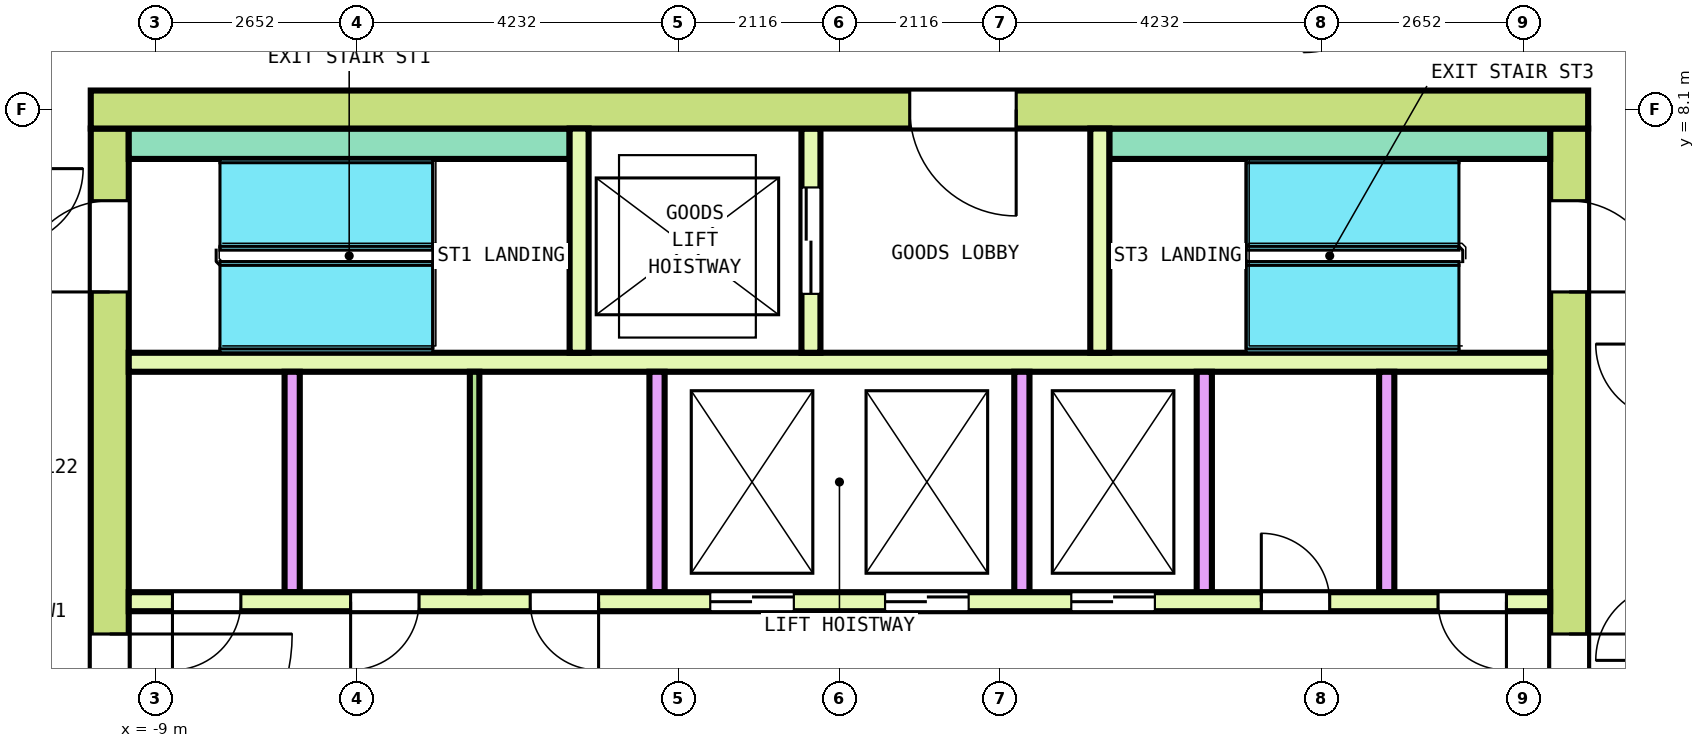
"""IFC4 building model, lengths in metres.
Left out: names, types, materials, properties, quantities, classifications, styles, units other than length and angle.
Written with IfcOpenShell. Run it as: python <this file> out.ifc"""

import sys

from ifc_helpers import new_model, si_unit, direction, frame, frame_2d, origin, place, context, subcontext, project, spatial, rectangle, extrude, element, fill, save


model = new_model("IFC4")
c1 = context("Model", 3, precision=1e-05, world=origin(), true_north=direction((0.0, 1.0)))
c2 = subcontext(c1, "Body", "Model", "MODEL_VIEW")
j1 = project(units=[si_unit("LENGTHUNIT", "METRE"), si_unit("PLANEANGLEUNIT", "RADIAN")], contexts=[c1])
p1 = place(None, origin())
s1 = spatial("IfcSite", under=j1, at=p1, CompositionType="ELEMENT")
p2 = place(p1, origin())
s2 = spatial("IfcBuilding", under=s1, at=p2, CompositionType="ELEMENT")
p3 = place(p2, frame((0.0, 0.0, 267.0)))
s3 = spatial("IfcBuildingStorey", under=s2, at=p3, CompositionType="ELEMENT", Elevation=267.0)
p4 = place(p3, frame((-9.85, 8.1, 0.0), z_axis=(0.0, 0.0, 1.0), x_axis=(1.0, 0.0, 0.0)))
e1 = element("IfcWall", 1, at=p4, inside=s3, PredefinedType="SHEAR", context=c2, shape_type="SweptSolid", body=[
    extrude(rectangle(XDim=19.7, YDim=0.5, at=frame_2d((9.85, 0.0))), origin(), (0.0, 0.0, 1.0), 3.7),
])
p5 = place(p4, frame((10.775, 0.0, 0.0)))
e2 = element("IfcOpeningElement", 2, at=p5, cuts=e1, PredefinedType="OPENING", context=c2, shape_type="SweptSolid", body=[
    extrude(rectangle(XDim=1.4, YDim=2.1, at=frame_2d((0.7, 1.05))), frame((0.0, 0.26, 0.0), z_axis=(0.0, -1.0, 0.0), x_axis=(1.0, 0.0, 0.0)), (0.0, 0.0, 1.0), 0.52),
])
p6 = place(p3, frame((-9.6, -7.85, 0.0), z_axis=(0.0, 0.0, 1.0), x_axis=(0.0, 1.0, 0.0)))
e3 = element("IfcWall", 3, at=p6, inside=s3, PredefinedType="SHEAR", context=c2, shape_type="SweptSolid", body=[
    extrude(rectangle(XDim=15.7, YDim=0.5, at=frame_2d((7.85, 0.0))), origin(), (0.0, 0.0, 1.0), 3.7),
])
p7 = place(p6, frame((6.65, 0.0, 0.0)))
e4 = element("IfcOpeningElement", 4, at=p7, cuts=e3, PredefinedType="OPENING", context=c2, shape_type="SweptSolid", body=[
    extrude(rectangle(XDim=2.4, YDim=2.1, at=frame_2d((1.2, 1.05))), frame((0.0, 0.26, 0.0), z_axis=(0.0, -1.0, 0.0), x_axis=(1.0, 0.0, 0.0)), (0.0, 0.0, 1.0), 0.52),
])
p8 = place(p6, frame((13.55, 0.0, 0.0)))
e5 = element("IfcOpeningElement", 5, at=p8, cuts=e3, PredefinedType="OPENING", context=c2, shape_type="SweptSolid", body=[
    extrude(rectangle(XDim=1.2, YDim=2.1, at=frame_2d((0.6, 1.05))), frame((0.0, 0.26, 0.0), z_axis=(0.0, -1.0, 0.0), x_axis=(1.0, 0.0, 0.0)), (0.0, 0.0, 1.0), 0.52),
])
p9 = place(p6, frame((0.95, 0.0, 0.0)))
e6 = element("IfcOpeningElement", 6, at=p9, cuts=e3, PredefinedType="OPENING", context=c2, shape_type="SweptSolid", body=[
    extrude(rectangle(XDim=1.2, YDim=2.1, at=frame_2d((0.6, 1.05))), frame((0.0, 0.26, 0.0), z_axis=(0.0, -1.0, 0.0), x_axis=(1.0, 0.0, 0.0)), (0.0, 0.0, 1.0), 0.52),
])
p10 = place(p3, frame((9.6, -7.85, 0.0), z_axis=(0.0, 0.0, 1.0), x_axis=(0.0, 1.0, 0.0)))
e7 = element("IfcWall", 7, at=p10, inside=s3, PredefinedType="SHEAR", context=c2, shape_type="SweptSolid", body=[
    extrude(rectangle(XDim=15.7, YDim=0.5, at=frame_2d((7.85, 0.0))), origin(), (0.0, 0.0, 1.0), 3.7),
])
p11 = place(p10, frame((6.65, 0.0, 0.0)))
e8 = element("IfcOpeningElement", 8, at=p11, cuts=e7, PredefinedType="OPENING", context=c2, shape_type="SweptSolid", body=[
    extrude(rectangle(XDim=2.4, YDim=2.1, at=frame_2d((1.2, 1.05))), frame((0.0, 0.26, 0.0), z_axis=(0.0, -1.0, 0.0), x_axis=(1.0, 0.0, 0.0)), (0.0, 0.0, 1.0), 0.52),
])
p12 = place(p10, frame((13.55, 0.0, 0.0)))
e9 = element("IfcOpeningElement", 9, at=p12, cuts=e7, PredefinedType="OPENING", context=c2, shape_type="SweptSolid", body=[
    extrude(rectangle(XDim=1.2, YDim=2.1, at=frame_2d((0.6, 1.05))), frame((0.0, 0.26, 0.0), z_axis=(0.0, -1.0, 0.0), x_axis=(1.0, 0.0, 0.0)), (0.0, 0.0, 1.0), 0.52),
])
p13 = place(p10, frame((1.05, 0.0, 0.0)))
e10 = element("IfcOpeningElement", 10, at=p13, cuts=e7, PredefinedType="OPENING", context=c2, shape_type="SweptSolid", body=[
    extrude(rectangle(XDim=1.0, YDim=2.1, at=frame_2d((0.5, 1.05))), frame((0.0, 0.26, 0.0), z_axis=(0.0, -1.0, 0.0), x_axis=(1.0, 0.0, 0.0)), (0.0, 0.0, 1.0), 0.52),
])
p14 = place(p3, frame((-9.35, 1.625, 0.0), z_axis=(0.0, 0.0, 1.0), x_axis=(1.0, 0.0, 0.0)))
e11 = element("IfcWall", 11, at=p14, inside=s3, PredefinedType="SOLIDWALL", context=c2, shape_type="SweptSolid", body=[
    extrude(rectangle(XDim=18.7, YDim=0.25, at=frame_2d((9.35, 0.0))), origin(), (0.0, 0.0, 1.0), 3.7),
])
p15 = place(p14, frame((7.65, 0.0, 0.0)))
e12 = element("IfcOpeningElement", 12, at=p15, cuts=e11, PredefinedType="OPENING", context=c2, shape_type="SweptSolid", body=[
    extrude(rectangle(XDim=1.1, YDim=2.1, at=frame_2d((0.55, 1.05))), frame((0.0, 0.135, 0.0), z_axis=(0.0, -1.0, 0.0), x_axis=(1.0, 0.0, 0.0)), (0.0, 0.0, 1.0), 0.27),
])
p16 = place(p14, frame((9.95, 0.0, 0.0)))
e13 = element("IfcOpeningElement", 13, at=p16, cuts=e11, PredefinedType="OPENING", context=c2, shape_type="SweptSolid", body=[
    extrude(rectangle(XDim=1.1, YDim=2.1, at=frame_2d((0.55, 1.05))), frame((0.0, 0.135, 0.0), z_axis=(0.0, -1.0, 0.0), x_axis=(1.0, 0.0, 0.0)), (0.0, 0.0, 1.0), 0.27),
])
p17 = place(p14, frame((12.4, 0.0, 0.0)))
e14 = element("IfcOpeningElement", 14, at=p17, cuts=e11, PredefinedType="OPENING", context=c2, shape_type="SweptSolid", body=[
    extrude(rectangle(XDim=1.1, YDim=2.1, at=frame_2d((0.55, 1.05))), frame((0.0, 0.135, 0.0), z_axis=(0.0, -1.0, 0.0), x_axis=(1.0, 0.0, 0.0)), (0.0, 0.0, 1.0), 0.27),
])
p18 = place(p14, frame((0.575, 0.0, 0.0)))
e15 = element("IfcOpeningElement", 15, at=p18, cuts=e11, PredefinedType="OPENING", context=c2, shape_type="SweptSolid", body=[
    extrude(rectangle(XDim=0.9, YDim=2.1, at=frame_2d((0.45, 1.05))), frame((0.0, 0.135, 0.0), z_axis=(0.0, -1.0, 0.0), x_axis=(1.0, 0.0, 0.0)), (0.0, 0.0, 1.0), 0.27),
])
p19 = place(p14, frame((2.919, 0.0, 0.0)))
e16 = element("IfcOpeningElement", 16, at=p19, cuts=e11, PredefinedType="OPENING", context=c2, shape_type="SweptSolid", body=[
    extrude(rectangle(XDim=0.9, YDim=2.1, at=frame_2d((0.45, 1.05))), frame((0.0, 0.135, 0.0), z_axis=(0.0, -1.0, 0.0), x_axis=(1.0, 0.0, 0.0)), (0.0, 0.0, 1.0), 0.27),
])
p20 = place(p14, frame((5.281, 0.0, 0.0)))
e17 = element("IfcOpeningElement", 17, at=p20, cuts=e11, PredefinedType="OPENING", context=c2, shape_type="SweptSolid", body=[
    extrude(rectangle(XDim=0.9, YDim=2.1, at=frame_2d((0.45, 1.05))), frame((0.0, 0.135, 0.0), z_axis=(0.0, -1.0, 0.0), x_axis=(1.0, 0.0, 0.0)), (0.0, 0.0, 1.0), 0.27),
])
p21 = place(p14, frame((14.9, 0.0, 0.0)))
e18 = element("IfcOpeningElement", 18, at=p21, cuts=e11, PredefinedType="OPENING", context=c2, shape_type="SweptSolid", body=[
    extrude(rectangle(XDim=0.9, YDim=2.1, at=frame_2d((0.45, 1.05))), frame((0.0, 0.135, 0.0), z_axis=(0.0, -1.0, 0.0), x_axis=(1.0, 0.0, 0.0)), (0.0, 0.0, 1.0), 0.27),
])
p22 = place(p14, frame((17.225, 0.0, 0.0)))
e19 = element("IfcOpeningElement", 19, at=p22, cuts=e11, PredefinedType="OPENING", context=c2, shape_type="SweptSolid", body=[
    extrude(rectangle(XDim=0.9, YDim=2.1, at=frame_2d((0.45, 1.05))), frame((0.0, 0.135, 0.0), z_axis=(0.0, -1.0, 0.0), x_axis=(1.0, 0.0, 0.0)), (0.0, 0.0, 1.0), 0.27),
])
p23 = place(p3, frame((-9.35, 4.775, 0.0), z_axis=(0.0, 0.0, 1.0), x_axis=(1.0, 0.0, 0.0)))
e20 = element("IfcWall", 20, at=p23, inside=s3, PredefinedType="SOLIDWALL", context=c2, shape_type="SweptSolid", body=[
    extrude(rectangle(XDim=18.7, YDim=0.25, at=frame_2d((9.35, 0.0))), origin(), (0.0, 0.0, 1.0), 3.7),
])
for number, where, z_axis, x_axis in (
    (21, (-7.2, 1.75, 0.0), (0.0, 0.0, 1.0), (0.0, 1.0, 0.0)),
    (22, (-2.4, 1.75, 0.0), (0.0, 0.0, 1.0), (0.0, 1.0, 0.0)),
    (23, (2.4, 1.75, 0.0), (0.0, 0.0, 1.0), (0.0, 1.0, 0.0)),
    (24, (4.8, 1.75, 0.0), (0.0, 0.0, 1.0), (0.0, 1.0, 0.0)),
    (25, (7.2, 1.75, 0.0), (0.0, 0.0, 1.0), (0.0, 1.0, 0.0)),
):
    element("IfcWall", number, at=place(p3, frame(where, z_axis=z_axis, x_axis=x_axis)), inside=s3, PredefinedType="SOLIDWALL", context=c2, shape_type="SweptSolid", body=[
        extrude(rectangle(XDim=2.9, YDim=0.2, at=frame_2d((1.45, 0.0))), origin(), (0.0, 0.0, 1.0), 3.7),
    ])
for number, where, z_axis, x_axis in (
    (26, (-9.35, 7.65, 0.0), (0.0, 0.0, 1.0), (1.0, 0.0, 0.0)),
    (27, (3.55, 7.65, 0.0), (0.0, 0.0, 1.0), (1.0, 0.0, 0.0)),
):
    element("IfcWall", number, at=place(p3, frame(where, z_axis=z_axis, x_axis=x_axis)), inside=s3, PredefinedType="SOLIDWALL", context=c2, shape_type="SweptSolid", body=[
        extrude(rectangle(XDim=5.8, YDim=0.4, at=frame_2d((2.9, 0.0))), origin(), (0.0, 0.0, 1.0), 3.7),
    ])
p24 = place(p3, frame((-3.425, 4.9, 0.0), z_axis=(0.0, 0.0, 1.0), x_axis=(0.0, 1.0, 0.0)))
e28 = element("IfcWall", 28, at=p24, inside=s3, PredefinedType="SOLIDWALL", context=c2, shape_type="SweptSolid", body=[
    extrude(rectangle(XDim=2.95, YDim=0.25, at=frame_2d((1.475, 0.0))), origin(), (0.0, 0.0, 1.0), 3.7),
])
p25 = place(p3, frame((-0.375, 4.9, 0.0), z_axis=(0.0, 0.0, 1.0), x_axis=(0.0, 1.0, 0.0)))
e29 = element("IfcWall", 29, at=p25, inside=s3, PredefinedType="SOLIDWALL", context=c2, shape_type="SweptSolid", body=[
    extrude(rectangle(XDim=2.95, YDim=0.25, at=frame_2d((1.475, 0.0))), origin(), (0.0, 0.0, 1.0), 3.7),
])
p26 = place(p25, frame((0.775, 0.0, 0.0)))
e30 = element("IfcOpeningElement", 30, at=p26, cuts=e29, PredefinedType="OPENING", context=c2, shape_type="SweptSolid", body=[
    extrude(rectangle(XDim=1.4, YDim=2.1, at=frame_2d((0.7, 1.05))), frame((0.0, 0.135, 0.0), z_axis=(0.0, -1.0, 0.0), x_axis=(1.0, 0.0, 0.0)), (0.0, 0.0, 1.0), 0.27),
])
p27 = place(p3, frame((3.425, 4.9, 0.0), z_axis=(0.0, 0.0, 1.0), x_axis=(0.0, 1.0, 0.0)))
e31 = element("IfcWall", 31, at=p27, inside=s3, PredefinedType="SOLIDWALL", context=c2, shape_type="SweptSolid", body=[
    extrude(rectangle(XDim=2.95, YDim=0.25, at=frame_2d((1.475, 0.0))), origin(), (0.0, 0.0, 1.0), 3.7),
])
p28 = place(p3, frame((-4.8, 1.75, 0.0), z_axis=(0.0, 0.0, 1.0), x_axis=(0.0, 1.0, 0.0)))
e32 = element("IfcWall", 32, at=p28, inside=s3, PredefinedType="PARTITIONING", context=c2, shape_type="SweptSolid", body=[
    extrude(rectangle(XDim=2.9, YDim=0.125, at=frame_2d((1.45, 0.0))), origin(), (0.0, 0.0, 1.0), 3.7),
])
p29 = place(p15, origin())
e33 = element("IfcDoor", 33, at=p29, inside=s3, OperationType="DOUBLE_DOOR_SLIDING", PredefinedType="DOOR", context=c2, shape_type="SweptSolid", body=[
    extrude(rectangle(XDim=1.1, YDim=2.1, at=frame_2d((0.55, 1.05))), frame((0.0, 0.075, 0.0), z_axis=(0.0, -1.0, 0.0), x_axis=(1.0, 0.0, 0.0)), (0.0, 0.0, 1.0), 0.15),
])
fill(e12, e33)
p30 = place(p16, origin())
e34 = element("IfcDoor", 34, at=p30, inside=s3, OperationType="DOUBLE_DOOR_SLIDING", PredefinedType="DOOR", context=c2, shape_type="SweptSolid", body=[
    extrude(rectangle(XDim=1.1, YDim=2.1, at=frame_2d((0.55, 1.05))), frame((0.0, 0.075, 0.0), z_axis=(0.0, -1.0, 0.0), x_axis=(1.0, 0.0, 0.0)), (0.0, 0.0, 1.0), 0.15),
])
fill(e13, e34)
p31 = place(p17, origin())
e35 = element("IfcDoor", 35, at=p31, inside=s3, OperationType="DOUBLE_DOOR_SLIDING", PredefinedType="DOOR", context=c2, shape_type="SweptSolid", body=[
    extrude(rectangle(XDim=1.1, YDim=2.1, at=frame_2d((0.55, 1.05))), frame((0.0, 0.075, 0.0), z_axis=(0.0, -1.0, 0.0), x_axis=(1.0, 0.0, 0.0)), (0.0, 0.0, 1.0), 0.15),
])
fill(e14, e35)
p32 = place(p26, origin())
e36 = element("IfcDoor", 36, at=p32, inside=s3, OperationType="DOUBLE_DOOR_SLIDING", PredefinedType="DOOR", context=c2, shape_type="SweptSolid", body=[
    extrude(rectangle(XDim=1.4, YDim=2.1, at=frame_2d((0.7, 1.05))), frame((0.0, 0.075, 0.0), z_axis=(0.0, -1.0, 0.0), x_axis=(1.0, 0.0, 0.0)), (0.0, 0.0, 1.0), 0.15),
])
fill(e30, e36)
p33 = place(p7, origin())
e37 = element("IfcDoor", 37, at=p33, inside=s3, OperationType="DOUBLE_DOOR_SINGLE_SWING", PredefinedType="DOOR", context=c2, shape_type="SweptSolid", body=[
    extrude(rectangle(XDim=2.4, YDim=2.1, at=frame_2d((1.2, 1.05))), frame((0.0, 0.2, 0.0), z_axis=(0.0, -1.0, 0.0), x_axis=(1.0, 0.0, 0.0)), (0.0, 0.0, 1.0), 0.4),
])
fill(e4, e37)
p34 = place(p11, origin())
e38 = element("IfcDoor", 38, at=p34, inside=s3, OperationType="DOUBLE_DOOR_SINGLE_SWING", PredefinedType="DOOR", context=c2, shape_type="SweptSolid", body=[
    extrude(rectangle(XDim=2.4, YDim=2.1, at=frame_2d((1.2, 1.05))), frame((0.0, 0.2, 0.0), z_axis=(0.0, -1.0, 0.0), x_axis=(1.0, 0.0, 0.0)), (0.0, 0.0, 1.0), 0.4),
])
fill(e8, e38)
p35 = place(p8, origin())
e39 = element("IfcDoor", 39, at=p35, inside=s3, OperationType="SINGLE_SWING_RIGHT", PredefinedType="DOOR", context=c2, shape_type="SweptSolid", body=[
    extrude(rectangle(XDim=1.2, YDim=2.1, at=frame_2d((0.6, 1.05))), frame((0.0, 0.2, 0.0), z_axis=(0.0, -1.0, 0.0), x_axis=(1.0, 0.0, 0.0)), (0.0, 0.0, 1.0), 0.4),
])
fill(e5, e39)
p36 = place(p12, origin())
e40 = element("IfcDoor", 40, at=p36, inside=s3, OperationType="SINGLE_SWING_RIGHT", PredefinedType="DOOR", context=c2, shape_type="SweptSolid", body=[
    extrude(rectangle(XDim=1.2, YDim=2.1, at=frame_2d((0.6, 1.05))), frame((0.0, 0.2, 0.0), z_axis=(0.0, -1.0, 0.0), x_axis=(1.0, 0.0, 0.0)), (0.0, 0.0, 1.0), 0.4),
])
fill(e9, e40)
p37 = place(p5, origin())
e41 = element("IfcDoor", 41, at=p37, inside=s3, OperationType="DOUBLE_DOOR_SINGLE_SWING", PredefinedType="DOOR", context=c2, shape_type="SweptSolid", body=[
    extrude(rectangle(XDim=1.4, YDim=2.1, at=frame_2d((0.7, 1.05))), frame((0.0, 0.2, 0.0), z_axis=(0.0, -1.0, 0.0), x_axis=(1.0, 0.0, 0.0)), (0.0, 0.0, 1.0), 0.4),
])
fill(e2, e41)
p38 = place(p18, origin())
e42 = element("IfcDoor", 42, at=p38, inside=s3, OperationType="SINGLE_SWING_RIGHT", PredefinedType="DOOR", context=c2, shape_type="SweptSolid", body=[
    extrude(rectangle(XDim=0.9, YDim=2.1, at=frame_2d((0.45, 1.05))), frame((0.0, 0.075, 0.0), z_axis=(0.0, -1.0, 0.0), x_axis=(1.0, 0.0, 0.0)), (0.0, 0.0, 1.0), 0.15),
])
fill(e15, e42)
p39 = place(p19, origin())
e43 = element("IfcDoor", 43, at=p39, inside=s3, OperationType="SINGLE_SWING_LEFT", PredefinedType="DOOR", context=c2, shape_type="SweptSolid", body=[
    extrude(rectangle(XDim=0.9, YDim=2.1, at=frame_2d((0.45, 1.05))), frame((0.0, 0.075, 0.0), z_axis=(0.0, -1.0, 0.0), x_axis=(1.0, 0.0, 0.0)), (0.0, 0.0, 1.0), 0.15),
])
fill(e16, e43)
p40 = place(p20, origin())
e44 = element("IfcDoor", 44, at=p40, inside=s3, OperationType="SINGLE_SWING_RIGHT", PredefinedType="DOOR", context=c2, shape_type="SweptSolid", body=[
    extrude(rectangle(XDim=0.9, YDim=2.1, at=frame_2d((0.45, 1.05))), frame((0.0, 0.075, 0.0), z_axis=(0.0, -1.0, 0.0), x_axis=(1.0, 0.0, 0.0)), (0.0, 0.0, 1.0), 0.15),
])
fill(e17, e44)
p41 = place(p21, origin())
e45 = element("IfcDoor", 45, at=p41, inside=s3, OperationType="SINGLE_SWING_LEFT", PredefinedType="DOOR", context=c2, shape_type="SweptSolid", body=[
    extrude(rectangle(XDim=0.9, YDim=2.1, at=frame_2d((0.45, 1.05))), frame((0.0, 0.075, 0.0), z_axis=(0.0, -1.0, 0.0), x_axis=(1.0, 0.0, 0.0)), (0.0, 0.0, 1.0), 0.15),
])
fill(e18, e45)
p42 = place(p22, origin())
e46 = element("IfcDoor", 46, at=p42, inside=s3, OperationType="SINGLE_SWING_RIGHT", PredefinedType="DOOR", context=c2, shape_type="SweptSolid", body=[
    extrude(rectangle(XDim=0.9, YDim=2.1, at=frame_2d((0.45, 1.05))), frame((0.0, 0.075, 0.0), z_axis=(0.0, -1.0, 0.0), x_axis=(1.0, 0.0, 0.0)), (0.0, 0.0, 1.0), 0.15),
])
fill(e19, e46)
save(model, sys.argv[1])
